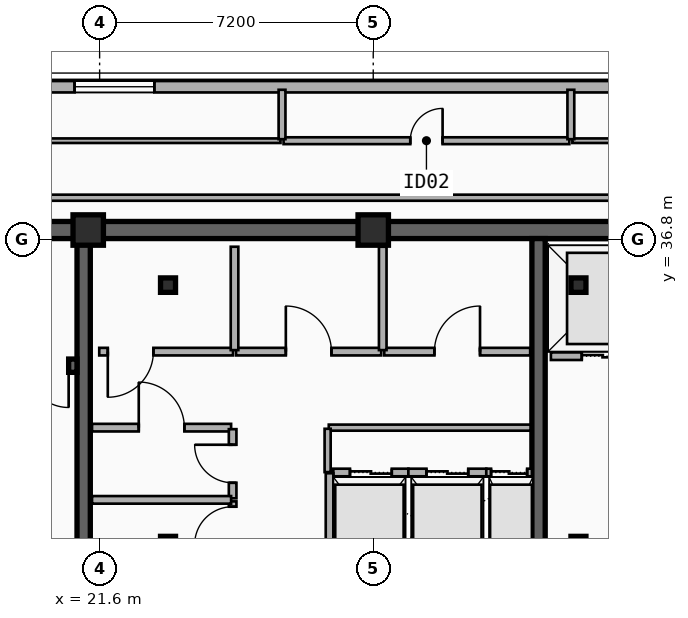
"""IFC4 building model, lengths in metres.
Left out: names, types, materials, properties, quantities, classifications, styles, units other than length and angle.
Written with IfcOpenShell. Run it as: python <this file> out.ifc"""

import sys

from ifc_helpers import new_model, si_unit, direction, frame, frame_2d, origin, origin_2d, place, context, subcontext, project, spatial, rectangle, i_section, extrude, element, fill, save


model = new_model("IFC4")
c1 = context("Model", 3, precision=1e-05, world=origin(), true_north=direction((0.0, 1.0)))
c2 = subcontext(c1, "Body", "Model", "MODEL_VIEW")
j1 = project(units=[si_unit("LENGTHUNIT", "METRE"), si_unit("PLANEANGLEUNIT", "RADIAN")], contexts=[c1])
p1 = place(None, origin())
s1 = spatial("IfcSite", under=j1, at=p1, CompositionType="ELEMENT")
p2 = place(p1, origin())
s2 = spatial("IfcBuilding", under=s1, at=p2, CompositionType="ELEMENT")
p3 = place(p2, frame((0.0, 0.0, 243.6)))
s3 = spatial("IfcBuildingStorey", under=s2, at=p3, CompositionType="ELEMENT", Elevation=243.6)
p4 = place(p3, frame((12.15, 37.05, 0.0), z_axis=(0.0, 0.0, 1.0), x_axis=(1.0, 0.0, 0.0)))
e1 = element("IfcWall", 1, at=p4, inside=s3, PredefinedType="SHEAR", context=c2, shape_type="SweptSolid", body=[
    extrude(rectangle(XDim=33.23, YDim=0.45, at=frame_2d((16.615, 0.0))), origin(), (0.0, 0.0, 1.0), 3.7),
])
for number, where, z_axis, x_axis in (
    (2, (21.18, 28.045, 0.0), (0.0, 0.0, 1.0), (0.0, 1.0, 0.0)),
    (3, (33.15, 28.045, 0.0), (0.0, 0.0, 1.0), (0.0, 1.0, 0.0)),
):
    element("IfcWall", number, at=place(p3, frame(where, z_axis=z_axis, x_axis=x_axis)), inside=s3, PredefinedType="SHEAR", context=c2, shape_type="SweptSolid", body=[
        extrude(rectangle(XDim=8.78, YDim=0.35, at=frame_2d((4.39, 0.0))), origin(), (0.0, 0.0, 1.0), 3.7),
    ])
p5 = place(p3, frame((21.005, 33.48, 0.0), z_axis=(0.0, 0.0, 1.0), x_axis=(-1.0, 0.0, 0.0)))
e4 = element("IfcWall", 4, at=p5, inside=s3, PredefinedType="SHEAR", context=c2, shape_type="SweptSolid", body=[
    extrude(rectangle(XDim=8.63, YDim=0.35, at=frame_2d((4.315, 0.0))), origin(), (0.0, 0.0, 1.0), 3.7),
])
p6 = place(p5, frame((0.22, 0.0, 0.0)))
e5 = element("IfcOpeningElement", 5, at=p6, cuts=e4, PredefinedType="OPENING", context=c2, shape_type="SweptSolid", body=[
    extrude(rectangle(XDim=1.1, YDim=2.15, at=frame_2d((0.55, 1.075))), frame((0.0, 0.185, 0.0), z_axis=(0.0, -1.0, 0.0), x_axis=(1.0, 0.0, 0.0)), (0.0, 0.0, 1.0), 0.37),
])
for number, where, z_axis, x_axis in (
    (6, (23.4, 28.8, 0.0), (0.0, 0.0, 1.0), (1.0, 0.0, 0.0)),
    (7, (34.2, 28.8, 0.0), (0.0, 0.0, 1.0), (1.0, 0.0, 0.0)),
    (8, (34.2, 35.6, 0.0), (0.0, 0.0, 1.0), (1.0, 0.0, 0.0)),
    (9, (23.4, 35.6, 0.0), (0.0, 0.0, 1.0), (1.0, 0.0, 0.0)),
):
    element("IfcColumn", number, at=place(p3, frame(where, z_axis=z_axis, x_axis=x_axis)), inside=s3, PredefinedType="COLUMN", context=c2, shape_type="SweptSolid", body=[
        extrude(i_section(OverallWidth=0.395, OverallDepth=0.38, WebThickness=0.019, FlangeThickness=0.03, FilletRadius=0.015, at=origin_2d()), origin(), (0.0, 0.0, 1.0), 3.7),
    ])
for number, where, z_axis, x_axis in (
    (10, (21.3, 37.05, 0.0), (0.0, 0.0, 1.0), (1.0, 0.0, 0.0)),
    (11, (28.8, 37.05, 0.0), (0.0, 0.0, 1.0), (1.0, 0.0, 0.0)),
):
    element("IfcColumn", number, at=place(p3, frame(where, z_axis=z_axis, x_axis=x_axis)), inside=s3, PredefinedType="COLUMN", context=c2, shape_type="SweptSolid", body=[
        extrude(rectangle(XDim=0.8, YDim=0.8, at=origin_2d()), origin(), (0.0, 0.0, 1.0), 3.7),
    ])
p7 = place(p3, frame((12.4, 40.82, 0.0), z_axis=(0.0, 0.0, 1.0), x_axis=(1.0, 0.0, 0.0)))
e12 = element("IfcWall", 12, at=p7, inside=s3, PredefinedType="SOLIDWALL", context=c2, shape_type="SweptSolid", body=[
    extrude(rectangle(XDim=32.8, YDim=0.3, at=frame_2d((16.4, 0.0))), origin(), (0.0, 0.0, 1.0), 3.42),
])
p8 = place(p7, frame((3.38, 0.0, 0.75)))
e13 = element("IfcOpeningElement", 13, at=p8, cuts=e12, PredefinedType="OPENING", context=c2, shape_type="SweptSolid", body=[
    extrude(rectangle(XDim=2.1, YDim=2.1, at=frame_2d((1.05, 1.05))), frame((0.0, 0.16, 0.0), z_axis=(0.0, -1.0, 0.0), x_axis=(1.0, 0.0, 0.0)), (0.0, 0.0, 1.0), 0.32),
])
p9 = place(p7, frame((8.54, 0.0, 0.75)))
e14 = element("IfcOpeningElement", 14, at=p9, cuts=e12, PredefinedType="OPENING", context=c2, shape_type="SweptSolid", body=[
    extrude(rectangle(XDim=2.1, YDim=2.1, at=frame_2d((1.05, 1.05))), frame((0.0, 0.16, 0.0), z_axis=(0.0, -1.0, 0.0), x_axis=(1.0, 0.0, 0.0)), (0.0, 0.0, 1.0), 0.32),
])
p10 = place(p3, frame((33.475, 33.73, 0.0), z_axis=(0.0, 0.0, 1.0), x_axis=(1.0, 0.0, 0.0)))
e15 = element("IfcWall", 15, at=p10, inside=s3, PredefinedType="PARTITIONING", context=c2, shape_type="SweptSolid", body=[
    extrude(rectangle(XDim=2.725, YDim=0.2, at=frame_2d((1.362, 0.0))), origin(), (0.0, 0.0, 1.0), 2.49),
])
p11 = place(p10, frame((0.812, 0.0, 0.0)))
e16 = element("IfcOpeningElement", 16, at=p11, cuts=e15, PredefinedType="OPENING", context=c2, shape_type="SweptSolid", body=[
    extrude(rectangle(XDim=1.1, YDim=2.15, at=frame_2d((0.55, 1.075))), frame((0.0, 0.11, 0.0), z_axis=(0.0, -1.0, 0.0), x_axis=(1.0, 0.0, 0.0)), (0.0, 0.0, 1.0), 0.22),
])
p12 = place(p3, frame((27.75, 30.67, 0.0), z_axis=(0.0, 0.0, 1.0), x_axis=(1.0, 0.0, 0.0)))
e17 = element("IfcWall", 17, at=p12, inside=s3, PredefinedType="PARTITIONING", context=c2, shape_type="SweptSolid", body=[
    extrude(rectangle(XDim=1.975, YDim=0.2, at=frame_2d((0.988, 0.0))), origin(), (0.0, 0.0, 1.0), 2.49),
])
p13 = place(p12, frame((0.438, 0.0, 0.0)))
e18 = element("IfcOpeningElement", 18, at=p13, cuts=e17, PredefinedType="OPENING", context=c2, shape_type="SweptSolid", body=[
    extrude(rectangle(XDim=1.1, YDim=2.15, at=frame_2d((0.55, 1.075))), frame((0.0, 0.11, 0.0), z_axis=(0.0, -1.0, 0.0), x_axis=(1.0, 0.0, 0.0)), (0.0, 0.0, 1.0), 0.22),
])
p14 = place(p3, frame((27.65, 28.07, 0.0), z_axis=(0.0, 0.0, 1.0), x_axis=(0.0, 1.0, 0.0)))
e19 = element("IfcWall", 19, at=p14, inside=s3, PredefinedType="PARTITIONING", context=c2, shape_type="SweptSolid", body=[
    extrude(rectangle(XDim=2.58, YDim=0.2, at=frame_2d((1.29, 0.0))), origin(), (0.0, 0.0, 1.0), 2.49),
])
p15 = place(p3, frame((29.725, 30.67, 0.0), z_axis=(0.0, 0.0, 1.0), x_axis=(1.0, 0.0, 0.0)))
e20 = element("IfcWall", 20, at=p15, inside=s3, PredefinedType="PARTITIONING", context=c2, shape_type="SweptSolid", body=[
    extrude(rectangle(XDim=2.05, YDim=0.2, at=frame_2d((1.025, 0.0))), origin(), (0.0, 0.0, 1.0), 2.8),
])
p16 = place(p15, frame((0.475, 0.0, 0.0)))
e21 = element("IfcOpeningElement", 21, at=p16, cuts=e20, PredefinedType="OPENING", context=c2, shape_type="SweptSolid", body=[
    extrude(rectangle(XDim=1.1, YDim=2.15, at=frame_2d((0.55, 1.075))), frame((0.0, 0.11, 0.0), z_axis=(0.0, -1.0, 0.0), x_axis=(1.0, 0.0, 0.0)), (0.0, 0.0, 1.0), 0.22),
])
p17 = place(p3, frame((31.775, 30.67, 0.0), z_axis=(0.0, 0.0, 1.0), x_axis=(1.0, 0.0, 0.0)))
e22 = element("IfcWall", 22, at=p17, inside=s3, PredefinedType="PARTITIONING", context=c2, shape_type="SweptSolid", body=[
    extrude(rectangle(XDim=1.2, YDim=0.2, at=frame_2d((0.6, 0.0))), origin(), (0.0, 0.0, 1.0), 2.8),
])
p18 = place(p17, frame((0.125, 0.0, 0.0)))
e23 = element("IfcOpeningElement", 23, at=p18, cuts=e22, PredefinedType="OPENING", context=c2, shape_type="SweptSolid", body=[
    extrude(rectangle(XDim=0.95, YDim=2.15, at=frame_2d((0.475, 1.075))), frame((0.0, 0.11, 0.0), z_axis=(0.0, -1.0, 0.0), x_axis=(1.0, 0.0, 0.0)), (0.0, 0.0, 1.0), 0.22),
])
p19 = place(p3, frame((21.4, 31.85, 0.0), z_axis=(0.0, 0.0, 1.0), x_axis=(1.0, 0.0, 0.0)))
e24 = element("IfcWall", 24, at=p19, inside=s3, PredefinedType="PARTITIONING", context=c2, shape_type="SweptSolid", body=[
    extrude(rectangle(XDim=3.66, YDim=0.2, at=frame_2d((1.83, 0.0))), origin(), (0.0, 0.0, 1.0), 2.49),
])
p20 = place(p19, frame((1.23, 0.0, 0.0)))
e25 = element("IfcOpeningElement", 25, at=p20, cuts=e24, PredefinedType="OPENING", context=c2, shape_type="SweptSolid", body=[
    extrude(rectangle(XDim=1.2, YDim=2.15, at=frame_2d((0.6, 1.075))), frame((0.0, 0.11, 0.0), z_axis=(0.0, -1.0, 0.0), x_axis=(1.0, 0.0, 0.0)), (0.0, 0.0, 1.0), 0.22),
])
p21 = place(p3, frame((25.11, 33.85, 0.0), z_axis=(0.0, 0.0, 1.0), x_axis=(-1.0, 0.0, 0.0)))
e26 = element("IfcWall", 26, at=p21, inside=s3, PredefinedType="PARTITIONING", context=c2, shape_type="SweptSolid", body=[
    extrude(rectangle(XDim=3.52, YDim=0.2, at=frame_2d((1.76, 0.0))), origin(), (0.0, 0.0, 1.0), 2.49),
])
p22 = place(p21, frame((2.095, 0.0, 0.0)))
e27 = element("IfcOpeningElement", 27, at=p22, cuts=e26, PredefinedType="OPENING", context=c2, shape_type="SweptSolid", body=[
    extrude(rectangle(XDim=1.2, YDim=2.15, at=frame_2d((0.6, 1.075))), frame((0.0, 0.11, 0.0), z_axis=(0.0, -1.0, 0.0), x_axis=(1.0, 0.0, 0.0)), (0.0, 0.0, 1.0), 0.22),
])
p23 = place(p3, frame((25.19, 33.85, 0.0), z_axis=(0.0, 0.0, 1.0), x_axis=(1.0, 0.0, 0.0)))
e28 = element("IfcWall", 28, at=p23, inside=s3, PredefinedType="PARTITIONING", context=c2, shape_type="SweptSolid", body=[
    extrude(rectangle(XDim=3.82, YDim=0.2, at=frame_2d((1.91, 0.0))), origin(), (0.0, 0.0, 1.0), 2.49),
])
p24 = place(p23, frame((1.31, 0.0, 0.0)))
e29 = element("IfcOpeningElement", 29, at=p24, cuts=e28, PredefinedType="OPENING", context=c2, shape_type="SweptSolid", body=[
    extrude(rectangle(XDim=1.2, YDim=2.15, at=frame_2d((0.6, 1.075))), frame((0.0, 0.11, 0.0), z_axis=(0.0, -1.0, 0.0), x_axis=(1.0, 0.0, 0.0)), (0.0, 0.0, 1.0), 0.22),
])
p25 = place(p3, frame((29.09, 33.85, 0.0), z_axis=(0.0, 0.0, 1.0), x_axis=(1.0, 0.0, 0.0)))
e30 = element("IfcWall", 30, at=p25, inside=s3, PredefinedType="PARTITIONING", context=c2, shape_type="SweptSolid", body=[
    extrude(rectangle(XDim=3.84, YDim=0.2, at=frame_2d((1.92, 0.0))), origin(), (0.0, 0.0, 1.0), 2.49),
])
p26 = place(p25, frame((1.32, 0.0, 0.0)))
e31 = element("IfcOpeningElement", 31, at=p26, cuts=e30, PredefinedType="OPENING", context=c2, shape_type="SweptSolid", body=[
    extrude(rectangle(XDim=1.2, YDim=2.15, at=frame_2d((0.6, 1.075))), frame((0.0, 0.11, 0.0), z_axis=(0.0, -1.0, 0.0), x_axis=(1.0, 0.0, 0.0)), (0.0, 0.0, 1.0), 0.22),
])
p27 = place(p3, frame((25.1, 28.09, 0.0), z_axis=(0.0, 0.0, 1.0), x_axis=(0.0, 1.0, 0.0)))
e32 = element("IfcWall", 32, at=p27, inside=s3, PredefinedType="PARTITIONING", context=c2, shape_type="SweptSolid", body=[
    extrude(rectangle(XDim=1.82, YDim=0.2, at=frame_2d((0.91, 0.0))), origin(), (0.0, 0.0, 1.0), 2.8),
])
p28 = place(p27, frame((0.68, 0.0, 0.0)))
e33 = element("IfcOpeningElement", 33, at=p28, cuts=e32, PredefinedType="OPENING", context=c2, shape_type="SweptSolid", body=[
    extrude(rectangle(XDim=1.0, YDim=2.15, at=frame_2d((0.5, 1.075))), frame((0.0, 0.11, 0.0), z_axis=(0.0, -1.0, 0.0), x_axis=(1.0, 0.0, 0.0)), (0.0, 0.0, 1.0), 0.22),
])
p29 = place(p3, frame((25.1, 29.99, 0.0), z_axis=(0.0, 0.0, 1.0), x_axis=(0.0, 1.0, 0.0)))
e34 = element("IfcWall", 34, at=p29, inside=s3, PredefinedType="PARTITIONING", context=c2, shape_type="SweptSolid", body=[
    extrude(rectangle(XDim=1.82, YDim=0.2, at=frame_2d((0.91, 0.0))), origin(), (0.0, 0.0, 1.0), 3.42),
])
p30 = place(p29, frame((0.41, 0.0, 0.0)))
e35 = element("IfcOpeningElement", 35, at=p30, cuts=e34, PredefinedType="OPENING", context=c2, shape_type="SweptSolid", body=[
    extrude(rectangle(XDim=1.0, YDim=2.15, at=frame_2d((0.5, 1.075))), frame((0.0, 0.11, 0.0), z_axis=(0.0, -1.0, 0.0), x_axis=(1.0, 0.0, 0.0)), (0.0, 0.0, 1.0), 0.22),
])
p31 = place(p3, frame((21.4, 29.95, 0.0), z_axis=(0.0, 0.0, 1.0), x_axis=(1.0, 0.0, 0.0)))
e36 = element("IfcWall", 36, at=p31, inside=s3, PredefinedType="PARTITIONING", context=c2, shape_type="SweptSolid", body=[
    extrude(rectangle(XDim=3.66, YDim=0.2, at=frame_2d((1.83, 0.0))), origin(), (0.0, 0.0, 1.0), 2.49),
])
p32 = place(p3, frame((25.15, 33.89, 0.0), z_axis=(0.0, 0.0, 1.0), x_axis=(0.0, 1.0, 0.0)))
e37 = element("IfcWall", 37, at=p32, inside=s3, PredefinedType="PARTITIONING", context=c2, shape_type="SweptSolid", body=[
    extrude(rectangle(XDim=2.72, YDim=0.2, at=frame_2d((1.36, 0.0))), origin(), (0.0, 0.0, 1.0), 3.42),
])
p33 = place(p3, frame((29.05, 33.89, 0.0), z_axis=(0.0, 0.0, 1.0), x_axis=(0.0, 1.0, 0.0)))
e38 = element("IfcWall", 38, at=p33, inside=s3, PredefinedType="PARTITIONING", context=c2, shape_type="SweptSolid", body=[
    extrude(rectangle(XDim=2.72, YDim=0.2, at=frame_2d((1.36, 0.0))), origin(), (0.0, 0.0, 1.0), 2.49),
])
p34 = place(p3, frame((8.46, 39.4, 0.0), z_axis=(0.0, 0.0, 1.0), x_axis=(1.0, 0.0, 0.0)))
e39 = element("IfcWall", 39, at=p34, inside=s3, PredefinedType="PARTITIONING", context=c2, shape_type="SweptSolid", body=[
    extrude(rectangle(XDim=17.9, YDim=0.12, at=frame_2d((8.95, 0.0))), origin(), (0.0, 0.0, 1.0), 3.42),
])
p35 = place(p34, frame((8.5, 0.0, 0.0)))
e40 = element("IfcOpeningElement", 40, at=p35, cuts=e39, PredefinedType="OPENING", context=c2, shape_type="SweptSolid", body=[
    extrude(rectangle(XDim=0.9, YDim=2.1, at=frame_2d((0.45, 1.05))), frame((0.0, 0.07, 0.0), z_axis=(0.0, -1.0, 0.0), x_axis=(1.0, 0.0, 0.0)), (0.0, 0.0, 1.0), 0.14),
])
p36 = place(p3, frame((26.44, 39.4, 0.0), z_axis=(0.0, 0.0, 1.0), x_axis=(1.0, 0.0, 0.0)))
e41 = element("IfcWall", 41, at=p36, inside=s3, PredefinedType="PLUMBINGWALL", context=c2, shape_type="SweptSolid", body=[
    extrude(rectangle(XDim=7.52, YDim=0.18, at=frame_2d((3.76, 0.0))), origin(), (0.0, 0.0, 1.0), 3.42),
])
p37 = place(p36, frame((3.335, 0.0, 0.0)))
e42 = element("IfcOpeningElement", 42, at=p37, cuts=e41, PredefinedType="OPENING", context=c2, shape_type="SweptSolid", body=[
    extrude(rectangle(XDim=0.85, YDim=2.1, at=frame_2d((0.425, 1.05))), frame((0.0, 0.1, 0.0), z_axis=(0.0, -1.0, 0.0), x_axis=(1.0, 0.0, 0.0)), (0.0, 0.0, 1.0), 0.2),
])
p38 = place(p3, frame((34.04, 39.4, 0.0), z_axis=(0.0, 0.0, 1.0), x_axis=(1.0, 0.0, 0.0)))
e43 = element("IfcWall", 43, at=p38, inside=s3, PredefinedType="PARTITIONING", context=c2, shape_type="SweptSolid", body=[
    extrude(rectangle(XDim=15.1, YDim=0.12, at=frame_2d((7.55, 0.0))), origin(), (0.0, 0.0, 1.0), 3.42),
])
p39 = place(p38, frame((7.1, 0.0, 0.0)))
e44 = element("IfcOpeningElement", 44, at=p39, cuts=e43, PredefinedType="OPENING", context=c2, shape_type="SweptSolid", body=[
    extrude(rectangle(XDim=0.9, YDim=2.1, at=frame_2d((0.45, 1.05))), frame((0.0, 0.07, 0.0), z_axis=(0.0, -1.0, 0.0), x_axis=(1.0, 0.0, 0.0)), (0.0, 0.0, 1.0), 0.14),
])
for number, where, z_axis, x_axis in (
    (45, (26.4, 39.44, 0.0), (0.0, 0.0, 1.0), (0.0, 1.0, 0.0)),
    (46, (34.0, 39.44, 0.0), (0.0, 0.0, 1.0), (0.0, 1.0, 0.0)),
):
    element("IfcWall", number, at=place(p3, frame(where, z_axis=z_axis, x_axis=x_axis)), inside=s3, PredefinedType="PLUMBINGWALL", context=c2, shape_type="SweptSolid", body=[
        extrude(rectangle(XDim=1.3, YDim=0.18, at=frame_2d((0.65, 0.0))), origin(), (0.0, 0.0, 1.0), 3.42),
    ])
p40 = place(p3, frame((27.63, 31.85, 0.0), z_axis=(0.0, 0.0, 1.0), x_axis=(1.0, 0.0, 0.0)))
e47 = element("IfcWall", 47, at=p40, inside=s3, PredefinedType="PARTITIONING", context=c2, shape_type="SweptSolid", body=[
    extrude(rectangle(XDim=5.31, YDim=0.16, at=frame_2d((2.655, 0.0))), origin(), (0.0, 0.0, 1.0), 2.49),
])
p41 = place(p3, frame((27.6, 30.68, 0.0), z_axis=(0.0, 0.0, 1.0), x_axis=(0.0, 1.0, 0.0)))
e48 = element("IfcWall", 48, at=p41, inside=s3, PredefinedType="PARTITIONING", context=c2, shape_type="SweptSolid", body=[
    extrude(rectangle(XDim=1.14, YDim=0.16, at=frame_2d((0.57, 0.0))), origin(), (0.0, 0.0, 1.0), 3.42),
])
p42 = place(p3, frame((11.28, 37.9, 0.0), z_axis=(0.0, 0.0, 1.0), x_axis=(1.0, 0.0, 0.0)))
e49 = element("IfcWall", 49, at=p42, inside=s3, PredefinedType="PARTITIONING", context=c2, shape_type="SweptSolid", body=[
    extrude(rectangle(XDim=35.04, YDim=0.16, at=frame_2d((17.52, 0.0))), origin(), (0.0, 0.0, 1.0), 3.42),
])
p43 = place(p9, origin())
e50 = element("IfcWindow", 50, at=p43, inside=s3, PartitioningType="SINGLE_PANEL", PredefinedType="WINDOW", context=c2, shape_type="SweptSolid", body=[
    extrude(rectangle(XDim=2.1, YDim=2.1, at=frame_2d((1.05, 1.05))), frame((0.0, 0.03, 0.0), z_axis=(0.0, -1.0, 0.0), x_axis=(1.0, 0.0, 0.0)), (0.0, 0.0, 1.0), 0.06),
])
fill(e14, e50)
p44 = place(p11, origin())
e51 = element("IfcDoor", 51, at=p44, inside=s3, OperationType="DOUBLE_DOOR_SLIDING", PredefinedType="DOOR", context=c2, shape_type="SweptSolid", body=[
    extrude(rectangle(XDim=1.1, YDim=2.15, at=frame_2d((0.55, 1.075))), frame((0.0, 0.025, 0.0), z_axis=(0.0, -1.0, 0.0), x_axis=(1.0, 0.0, 0.0)), (0.0, 0.0, 1.0), 0.05),
])
fill(e16, e51)
p45 = place(p13, origin())
e52 = element("IfcDoor", 52, at=p45, inside=s3, OperationType="DOUBLE_DOOR_SLIDING", PredefinedType="DOOR", context=c2, shape_type="SweptSolid", body=[
    extrude(rectangle(XDim=1.1, YDim=2.15, at=frame_2d((0.55, 1.075))), frame((0.0, 0.025, 0.0), z_axis=(0.0, -1.0, 0.0), x_axis=(1.0, 0.0, 0.0)), (0.0, 0.0, 1.0), 0.05),
])
fill(e18, e52)
p46 = place(p16, origin())
e53 = element("IfcDoor", 53, at=p46, inside=s3, OperationType="DOUBLE_DOOR_SLIDING", PredefinedType="DOOR", context=c2, shape_type="SweptSolid", body=[
    extrude(rectangle(XDim=1.1, YDim=2.15, at=frame_2d((0.55, 1.075))), frame((0.0, 0.025, 0.0), z_axis=(0.0, -1.0, 0.0), x_axis=(1.0, 0.0, 0.0)), (0.0, 0.0, 1.0), 0.05),
])
fill(e21, e53)
p47 = place(p18, origin())
e54 = element("IfcDoor", 54, at=p47, inside=s3, OperationType="DOUBLE_DOOR_SLIDING", PredefinedType="DOOR", context=c2, shape_type="SweptSolid", body=[
    extrude(rectangle(XDim=0.95, YDim=2.15, at=frame_2d((0.475, 1.075))), frame((0.0, 0.025, 0.0), z_axis=(0.0, -1.0, 0.0), x_axis=(1.0, 0.0, 0.0)), (0.0, 0.0, 1.0), 0.05),
])
fill(e23, e54)
p48 = place(p6, origin())
e55 = element("IfcDoor", 55, at=p48, inside=s3, OperationType="SINGLE_SWING_LEFT", PredefinedType="DOOR", context=c2, shape_type="SweptSolid", body=[
    extrude(rectangle(XDim=1.1, YDim=2.15, at=frame_2d((0.55, 1.075))), frame((0.0, 0.025, 0.0), z_axis=(0.0, -1.0, 0.0), x_axis=(1.0, 0.0, 0.0)), (0.0, 0.0, 1.0), 0.05),
])
fill(e5, e55)
p49 = place(p20, origin())
e56 = element("IfcDoor", 56, at=p49, inside=s3, OperationType="SINGLE_SWING_LEFT", PredefinedType="DOOR", context=c2, shape_type="SweptSolid", body=[
    extrude(rectangle(XDim=1.2, YDim=2.15, at=frame_2d((0.6, 1.075))), frame((0.0, 0.025, 0.0), z_axis=(0.0, -1.0, 0.0), x_axis=(1.0, 0.0, 0.0)), (0.0, 0.0, 1.0), 0.05),
])
fill(e25, e56)
p50 = place(p22, origin())
e57 = element("IfcDoor", 57, at=p50, inside=s3, OperationType="SINGLE_SWING_RIGHT", PredefinedType="DOOR", context=c2, shape_type="SweptSolid", body=[
    extrude(rectangle(XDim=1.2, YDim=2.15, at=frame_2d((0.6, 1.075))), frame((0.0, 0.025, 0.0), z_axis=(0.0, -1.0, 0.0), x_axis=(1.0, 0.0, 0.0)), (0.0, 0.0, 1.0), 0.05),
])
fill(e27, e57)
p51 = place(p24, origin())
e58 = element("IfcDoor", 58, at=p51, inside=s3, OperationType="SINGLE_SWING_LEFT", PredefinedType="DOOR", context=c2, shape_type="SweptSolid", body=[
    extrude(rectangle(XDim=1.2, YDim=2.15, at=frame_2d((0.6, 1.075))), frame((0.0, 0.025, 0.0), z_axis=(0.0, -1.0, 0.0), x_axis=(1.0, 0.0, 0.0)), (0.0, 0.0, 1.0), 0.05),
])
fill(e29, e58)
p52 = place(p26, origin())
e59 = element("IfcDoor", 59, at=p52, inside=s3, OperationType="SINGLE_SWING_RIGHT", PredefinedType="DOOR", context=c2, shape_type="SweptSolid", body=[
    extrude(rectangle(XDim=1.2, YDim=2.15, at=frame_2d((0.6, 1.075))), frame((0.0, 0.025, 0.0), z_axis=(0.0, -1.0, 0.0), x_axis=(1.0, 0.0, 0.0)), (0.0, 0.0, 1.0), 0.05),
])
fill(e31, e59)
p53 = place(p28, origin())
e60 = element("IfcDoor", 60, at=p53, inside=s3, OperationType="SINGLE_SWING_LEFT", PredefinedType="DOOR", context=c2, shape_type="SweptSolid", body=[
    extrude(rectangle(XDim=1.0, YDim=2.15, at=frame_2d((0.5, 1.075))), frame((0.0, 0.025, 0.0), z_axis=(0.0, -1.0, 0.0), x_axis=(1.0, 0.0, 0.0)), (0.0, 0.0, 1.0), 0.05),
])
fill(e33, e60)
p54 = place(p30, origin())
e61 = element("IfcDoor", 61, at=p54, inside=s3, OperationType="SINGLE_SWING_RIGHT", PredefinedType="DOOR", context=c2, shape_type="SweptSolid", body=[
    extrude(rectangle(XDim=1.0, YDim=2.15, at=frame_2d((0.5, 1.075))), frame((0.0, 0.025, 0.0), z_axis=(0.0, -1.0, 0.0), x_axis=(1.0, 0.0, 0.0)), (0.0, 0.0, 1.0), 0.05),
])
fill(e35, e61)
p55 = place(p37, origin())
e62 = element("IfcDoor", 62, at=p55, inside=s3, OperationType="SINGLE_SWING_RIGHT", PredefinedType="DOOR", context=c2, shape_type="SweptSolid", body=[
    extrude(rectangle(XDim=0.85, YDim=2.1, at=frame_2d((0.425, 1.05))), frame((0.0, 0.025, 0.0), z_axis=(0.0, -1.0, 0.0), x_axis=(1.0, 0.0, 0.0)), (0.0, 0.0, 1.0), 0.05),
])
fill(e42, e62)
save(model, sys.argv[1])
